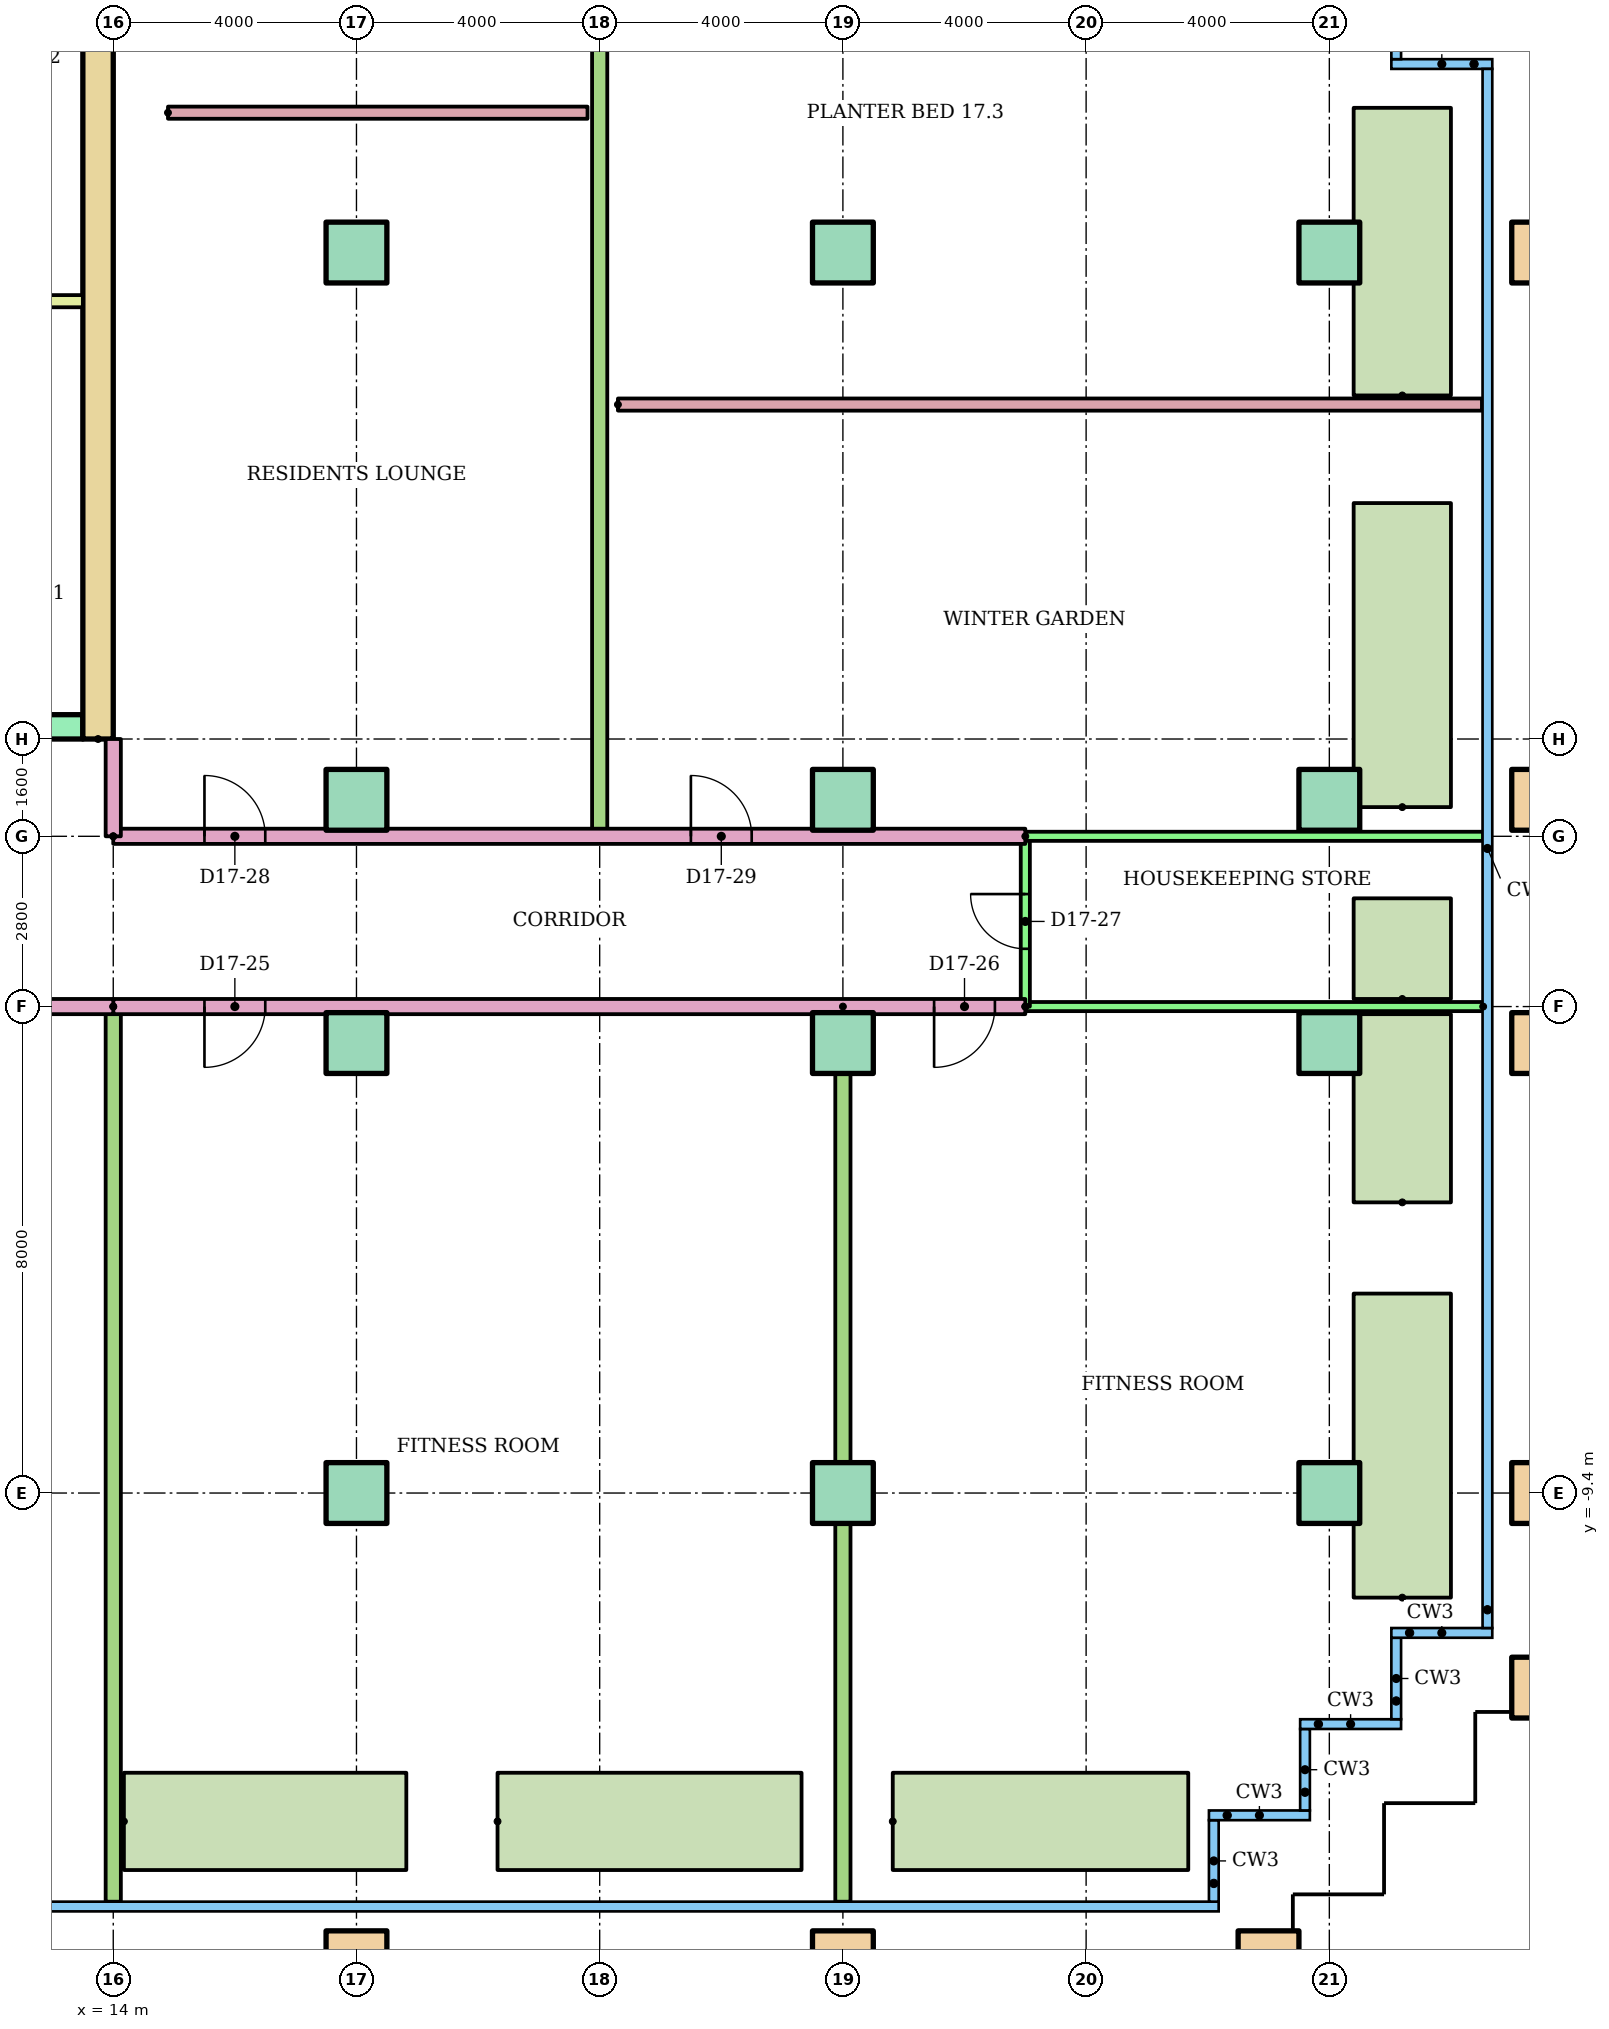
"""IFC4 building model, lengths in metres.
Left out: names, types, materials, properties, quantities, classifications, styles, units other than length and angle.
Written with IfcOpenShell. Run it as: python <this file> out.ifc"""

import sys

from ifc_helpers import new_model, si_unit, direction, frame, frame_2d, origin, origin_2d, place, context, subcontext, project, spatial, rectangle, hollow_rectangle, extrude, element, fill, save


model = new_model("IFC4")
c1 = context("Model", 3, precision=1e-05, world=origin(), true_north=direction((0.0, 1.0)))
c2 = subcontext(c1, "Body", "Model", "MODEL_VIEW")
j1 = project(units=[si_unit("LENGTHUNIT", "METRE"), si_unit("PLANEANGLEUNIT", "RADIAN")], contexts=[c1])
p1 = place(None, origin())
s1 = spatial("IfcSite", under=j1, at=p1, CompositionType="ELEMENT")
p2 = place(p1, origin())
s2 = spatial("IfcBuilding", under=s1, at=p2, CompositionType="ELEMENT")
p3 = place(p2, frame((0.0, 0.0, 64.0)))
s3 = spatial("IfcBuildingStorey", under=s2, at=p3, CompositionType="ELEMENT", Elevation=64.0)
for number, where in (
    (1, (18.0, -17.1, 0.0)),
    (2, (26.0, -17.1, 0.0)),
):
    element("IfcColumn", number, at=place(p3, frame(where)), inside=s3, PredefinedType="COLUMN", context=c2, shape_type="SweptSolid", body=[
        extrude(hollow_rectangle(XDim=1.0, YDim=1.0, WallThickness=0.05, at=origin_2d()), origin(), (0.0, 0.0, 1.0), 9.6),
    ])
for number, where in (
    (3, (33.0, -17.1, 0.0)),
    (4, (37.5, -12.6, 0.0)),
):
    element("IfcColumn", number, at=place(p3, frame(where)), inside=s3, PredefinedType="COLUMN", context=c2, shape_type="SweptSolid", body=[
        extrude(hollow_rectangle(XDim=1.0, YDim=1.0, WallThickness=0.05, at=origin_2d()), origin(), (0.0, 0.0, 1.0), 8.8),
    ])
for number, where in (
    (5, (18.0, -9.4, 0.0)),
    (6, (26.0, -9.4, 0.0)),
    (7, (34.0, -9.4, 0.0)),
):
    element("IfcColumn", number, at=place(p3, frame(where)), inside=s3, PredefinedType="COLUMN", context=c2, shape_type="SweptSolid", body=[
        extrude(rectangle(XDim=1.0, YDim=1.0, at=origin_2d()), origin(), (0.0, 0.0, 1.0), 9.6),
    ])
p4 = place(p3, frame((37.5, -9.4, 0.0)))
e8 = element("IfcColumn", 8, at=p4, inside=s3, PredefinedType="COLUMN", context=c2, shape_type="SweptSolid", body=[
    extrude(hollow_rectangle(XDim=1.0, YDim=1.0, WallThickness=0.05, at=origin_2d()), origin(), (0.0, 0.0, 1.0), 8.8),
])
for number, where in (
    (9, (18.0, -2.0, 0.0)),
    (10, (26.0, -2.0, 0.0)),
    (11, (34.0, -2.0, 0.0)),
):
    element("IfcColumn", number, at=place(p3, frame(where)), inside=s3, PredefinedType="COLUMN", context=c2, shape_type="SweptSolid", body=[
        extrude(rectangle(XDim=1.0, YDim=1.0, at=origin_2d()), origin(), (0.0, 0.0, 1.0), 9.6),
    ])
p5 = place(p3, frame((37.5, -2.0, 0.0)))
e12 = element("IfcColumn", 12, at=p5, inside=s3, PredefinedType="COLUMN", context=c2, shape_type="SweptSolid", body=[
    extrude(hollow_rectangle(XDim=1.0, YDim=1.0, WallThickness=0.05, at=origin_2d()), origin(), (0.0, 0.0, 1.0), 8.8),
])
for number, where in (
    (13, (18.0, 2.0, 0.0)),
    (14, (26.0, 2.0, 0.0)),
    (15, (34.0, 2.0, 0.0)),
):
    element("IfcColumn", number, at=place(p3, frame(where)), inside=s3, PredefinedType="COLUMN", context=c2, shape_type="SweptSolid", body=[
        extrude(rectangle(XDim=1.0, YDim=1.0, at=origin_2d()), origin(), (0.0, 0.0, 1.0), 9.6),
    ])
p6 = place(p3, frame((37.5, 2.0, 0.0)))
e16 = element("IfcColumn", 16, at=p6, inside=s3, PredefinedType="COLUMN", context=c2, shape_type="SweptSolid", body=[
    extrude(hollow_rectangle(XDim=1.0, YDim=1.0, WallThickness=0.05, at=origin_2d()), origin(), (0.0, 0.0, 1.0), 8.8),
])
for number, where in (
    (17, (18.0, 11.0, 0.0)),
    (18, (26.0, 11.0, 0.0)),
    (19, (34.0, 11.0, 0.0)),
):
    element("IfcColumn", number, at=place(p3, frame(where)), inside=s3, PredefinedType="COLUMN", context=c2, shape_type="SweptSolid", body=[
        extrude(rectangle(XDim=1.0, YDim=1.0, at=origin_2d()), origin(), (0.0, 0.0, 1.0), 9.6),
    ])
p7 = place(p3, frame((37.5, 11.0, 0.0)))
e20 = element("IfcColumn", 20, at=p7, inside=s3, PredefinedType="COLUMN", context=c2, shape_type="SweptSolid", body=[
    extrude(hollow_rectangle(XDim=1.0, YDim=1.0, WallThickness=0.05, at=origin_2d()), origin(), (0.0, 0.0, 1.0), 8.8),
])
p8 = place(p3, frame((20.32, -14.8, 0.0)))
e21 = element("IfcWall", 21, at=p8, inside=s3, PredefinedType="STANDARD", context=c2, shape_type="SweptSolid", body=[
    extrude(rectangle(XDim=5.0, YDim=1.6, at=frame_2d((2.5, 0.0))), origin(), (0.0, 0.0, 1.0), 0.8),
])
p9 = place(p3, frame((26.82, -14.8, 0.0)))
e22 = element("IfcWall", 22, at=p9, inside=s3, PredefinedType="STANDARD", context=c2, shape_type="SweptSolid", body=[
    extrude(rectangle(XDim=4.86, YDim=1.6, at=frame_2d((2.43, 0.0))), origin(), (0.0, 0.0, 1.0), 0.8),
])
for number, where, z_axis, x_axis in (
    (23, (35.2, -11.12, 0.0), (0.0, 0.0, 1.0), (0.0, 1.0, 0.0)),
    (24, (35.2, 1.88, 0.0), (0.0, 0.0, 1.0), (0.0, 1.0, 0.0)),
):
    element("IfcWall", number, at=place(p3, frame(where, z_axis=z_axis, x_axis=x_axis)), inside=s3, PredefinedType="STANDARD", context=c2, shape_type="SweptSolid", body=[
        extrude(rectangle(XDim=5.0, YDim=1.6, at=frame_2d((2.5, 0.0))), origin(), (0.0, 0.0, 1.0), 0.8),
    ])
p10 = place(p3, frame((13.75, 3.0, 0.0), z_axis=(0.0, 0.0, 1.0), x_axis=(0.0, 1.0, 0.0)))
e25 = element("IfcWall", 25, at=p10, inside=s3, PredefinedType="SHEAR", context=c2, shape_type="SweptSolid", body=[
    extrude(rectangle(XDim=17.0, YDim=0.5, at=frame_2d((8.5, 0.0))), origin(), (0.0, 0.0, 1.0), 8.8),
])
p11 = place(p3, frame((-13.5, 3.2, 0.0)))
e26 = element("IfcWall", 26, at=p11, inside=s3, PredefinedType="SHEAR", context=c2, shape_type="SweptSolid", body=[
    extrude(rectangle(XDim=27.0, YDim=0.4, at=frame_2d((13.5, 0.0))), origin(), (0.0, 0.0, 1.0), 8.8),
])
p12 = place(p11, frame((6.861, 0.0, 0.0)))
e27 = element("IfcOpeningElement", 27, at=p12, cuts=e26, PredefinedType="OPENING", context=c2, shape_type="SweptSolid", body=[
    extrude(rectangle(XDim=1.1, YDim=2.1, at=frame_2d((0.55, 1.05))), frame((0.0, 0.21, 0.0), z_axis=(0.0, -1.0, 0.0), x_axis=(1.0, 0.0, 0.0)), (0.0, 0.0, 1.0), 0.42),
])
p13 = place(p11, frame((9.906, 0.0, 0.0)))
e28 = element("IfcOpeningElement", 28, at=p13, cuts=e26, PredefinedType="OPENING", context=c2, shape_type="SweptSolid", body=[
    extrude(rectangle(XDim=1.1, YDim=2.1, at=frame_2d((0.55, 1.05))), frame((0.0, 0.21, 0.0), z_axis=(0.0, -1.0, 0.0), x_axis=(1.0, 0.0, 0.0)), (0.0, 0.0, 1.0), 0.42),
])
p14 = place(p11, frame((15.994, 0.0, 0.0)))
e29 = element("IfcOpeningElement", 29, at=p14, cuts=e26, PredefinedType="OPENING", context=c2, shape_type="SweptSolid", body=[
    extrude(rectangle(XDim=1.1, YDim=2.1, at=frame_2d((0.55, 1.05))), frame((0.0, 0.21, 0.0), z_axis=(0.0, -1.0, 0.0), x_axis=(1.0, 0.0, 0.0)), (0.0, 0.0, 1.0), 0.42),
])
p15 = place(p11, frame((19.039, 0.0, 0.0)))
e30 = element("IfcOpeningElement", 30, at=p15, cuts=e26, PredefinedType="OPENING", context=c2, shape_type="SweptSolid", body=[
    extrude(rectangle(XDim=1.1, YDim=2.1, at=frame_2d((0.55, 1.05))), frame((0.0, 0.21, 0.0), z_axis=(0.0, -1.0, 0.0), x_axis=(1.0, 0.0, 0.0)), (0.0, 0.0, 1.0), 0.42),
])
p16 = place(p11, frame((12.6, 0.0, 0.0)))
e31 = element("IfcOpeningElement", 31, at=p16, cuts=e26, PredefinedType="OPENING", context=c2, shape_type="SweptSolid", body=[
    extrude(rectangle(XDim=1.8, YDim=2.1, at=frame_2d((0.9, 1.05))), frame((0.0, 0.21, 0.0), z_axis=(0.0, -1.0, 0.0), x_axis=(1.0, 0.0, 0.0)), (0.0, 0.0, 1.0), 0.42),
])
p17 = place(p3, frame((9.6, 10.2, 0.0)))
e32 = element("IfcWall", 32, at=p17, inside=s3, PredefinedType="PARTITIONING", context=c2, shape_type="SweptSolid", body=[
    extrude(rectangle(XDim=3.9, YDim=0.2, at=frame_2d((1.95, 0.0))), origin(), (0.0, 0.0, 1.0), 8.8),
])
p18 = place(p3, frame((29.0, -1.4, 0.0), z_axis=(0.0, 0.0, 1.0), x_axis=(-1.0, 0.0, 0.0)))
e33 = element("IfcWall", 33, at=p18, inside=s3, PredefinedType="PARTITIONING", context=c2, shape_type="SweptSolid", body=[
    extrude(rectangle(XDim=15.0, YDim=0.25, at=frame_2d((7.5, 0.0))), origin(), (0.0, 0.0, 1.0), 8.8),
])
p19 = place(p18, frame((12.5, 0.0, 0.0)))
e34 = element("IfcOpeningElement", 34, at=p19, cuts=e33, PredefinedType="OPENING", context=c2, shape_type="SweptSolid", body=[
    extrude(rectangle(XDim=1.0, YDim=2.1, at=frame_2d((0.5, 1.05))), frame((0.0, 0.135, 0.0), z_axis=(0.0, -1.0, 0.0), x_axis=(1.0, 0.0, 0.0)), (0.0, 0.0, 1.0), 0.27),
])
p20 = place(p18, frame((0.5, 0.0, 0.0)))
e35 = element("IfcOpeningElement", 35, at=p20, cuts=e33, PredefinedType="OPENING", context=c2, shape_type="SweptSolid", body=[
    extrude(rectangle(XDim=1.0, YDim=2.1, at=frame_2d((0.5, 1.05))), frame((0.0, 0.135, 0.0), z_axis=(0.0, -1.0, 0.0), x_axis=(1.0, 0.0, 0.0)), (0.0, 0.0, 1.0), 0.27),
])
p21 = place(p3, frame((36.53, -1.4, 0.0), z_axis=(0.0, 0.0, 1.0), x_axis=(-1.0, 0.0, 0.0)))
e36 = element("IfcWall", 36, at=p21, inside=s3, PredefinedType="PARTITIONING", context=c2, shape_type="SweptSolid", body=[
    extrude(rectangle(XDim=7.53, YDim=0.15, at=frame_2d((3.765, 0.0))), origin(), (0.0, 0.0, 1.0), 8.8),
])
p22 = place(p3, frame((29.0, -1.4, 0.0), z_axis=(0.0, 0.0, 1.0), x_axis=(0.0, 1.0, 0.0)))
e37 = element("IfcWall", 37, at=p22, inside=s3, PredefinedType="PARTITIONING", context=c2, shape_type="SweptSolid", body=[
    extrude(rectangle(XDim=2.8, YDim=0.15, at=frame_2d((1.4, 0.0))), origin(), (0.0, 0.0, 1.0), 8.8),
])
p23 = place(p22, frame((0.95, 0.0, 0.0)))
e38 = element("IfcOpeningElement", 38, at=p23, cuts=e37, PredefinedType="OPENING", context=c2, shape_type="SweptSolid", body=[
    extrude(rectangle(XDim=0.9, YDim=2.1, at=frame_2d((0.45, 1.05))), frame((0.0, 0.085, 0.0), z_axis=(0.0, -1.0, 0.0), x_axis=(1.0, 0.0, 0.0)), (0.0, 0.0, 1.0), 0.17),
])
for number, where, z_axis, x_axis in (
    (39, (14.0, -1.4, 0.0), (0.0, 0.0, 1.0), (0.0, -1.0, 0.0)),
    (40, (26.0, -1.4, 0.0), (0.0, 0.0, 1.0), (0.0, -1.0, 0.0)),
):
    element("IfcWall", number, at=place(p3, frame(where, z_axis=z_axis, x_axis=x_axis)), inside=s3, PredefinedType="PARTITIONING", context=c2, shape_type="SweptSolid", body=[
        extrude(rectangle(XDim=14.721, YDim=0.25, at=frame_2d((7.361, 0.0))), origin(), (0.0, 0.0, 1.0), 8.8),
    ])
p24 = place(p3, frame((14.0, 1.4, 0.0)))
e41 = element("IfcWall", 41, at=p24, inside=s3, PredefinedType="PARTITIONING", context=c2, shape_type="SweptSolid", body=[
    extrude(rectangle(XDim=15.0, YDim=0.25, at=frame_2d((7.5, 0.0))), origin(), (0.0, 0.0, 1.0), 8.8),
])
p25 = place(p24, frame((1.5, 0.0, 0.0)))
e42 = element("IfcOpeningElement", 42, at=p25, cuts=e41, PredefinedType="OPENING", context=c2, shape_type="SweptSolid", body=[
    extrude(rectangle(XDim=1.0, YDim=2.1, at=frame_2d((0.5, 1.05))), frame((0.0, 0.135, 0.0), z_axis=(0.0, -1.0, 0.0), x_axis=(1.0, 0.0, 0.0)), (0.0, 0.0, 1.0), 0.27),
])
p26 = place(p24, frame((9.5, 0.0, 0.0)))
e43 = element("IfcOpeningElement", 43, at=p26, cuts=e41, PredefinedType="OPENING", context=c2, shape_type="SweptSolid", body=[
    extrude(rectangle(XDim=1.0, YDim=2.1, at=frame_2d((0.5, 1.05))), frame((0.0, 0.135, 0.0), z_axis=(0.0, -1.0, 0.0), x_axis=(1.0, 0.0, 0.0)), (0.0, 0.0, 1.0), 0.27),
])
p27 = place(p3, frame((29.0, 1.4, 0.0)))
e44 = element("IfcWall", 44, at=p27, inside=s3, PredefinedType="PARTITIONING", context=c2, shape_type="SweptSolid", body=[
    extrude(rectangle(XDim=7.53, YDim=0.15, at=frame_2d((3.765, 0.0))), origin(), (0.0, 0.0, 1.0), 8.8),
])
p28 = place(p3, frame((22.0, 18.521, 0.0), z_axis=(0.0, 0.0, 1.0), x_axis=(0.0, -1.0, 0.0)))
e45 = element("IfcWall", 45, at=p28, inside=s3, PredefinedType="PARTITIONING", context=c2, shape_type="SweptSolid", body=[
    extrude(rectangle(XDim=17.121, YDim=0.25, at=frame_2d((8.561, 0.0))), origin(), (0.0, 0.0, 1.0), 8.8),
])
p29 = place(p3, frame((14.0, -1.4, 0.0), z_axis=(0.0, 0.0, 1.0), x_axis=(-1.0, 0.0, 0.0)))
e46 = element("IfcWall", 46, at=p29, inside=s3, PredefinedType="PARTITIONING", context=c2, shape_type="SweptSolid", body=[
    extrude(rectangle(XDim=28.0, YDim=0.25, at=frame_2d((14.0, 0.0))), origin(), (0.0, 0.0, 1.0), 8.8),
])
p30 = place(p29, frame((21.5, 0.0, 0.0)))
e47 = element("IfcOpeningElement", 47, at=p30, cuts=e46, PredefinedType="OPENING", context=c2, shape_type="SweptSolid", body=[
    extrude(rectangle(XDim=1.0, YDim=2.1, at=frame_2d((0.5, 1.05))), frame((0.0, 0.135, 0.0), z_axis=(0.0, -1.0, 0.0), x_axis=(1.0, 0.0, 0.0)), (0.0, 0.0, 1.0), 0.27),
])
p31 = place(p29, frame((17.5, 0.0, 0.0)))
e48 = element("IfcOpeningElement", 48, at=p31, cuts=e46, PredefinedType="OPENING", context=c2, shape_type="SweptSolid", body=[
    extrude(rectangle(XDim=1.0, YDim=2.1, at=frame_2d((0.5, 1.05))), frame((0.0, 0.135, 0.0), z_axis=(0.0, -1.0, 0.0), x_axis=(1.0, 0.0, 0.0)), (0.0, 0.0, 1.0), 0.27),
])
p32 = place(p29, frame((1.5, 0.0, 0.0)))
e49 = element("IfcOpeningElement", 49, at=p32, cuts=e46, PredefinedType="OPENING", context=c2, shape_type="SweptSolid", body=[
    extrude(rectangle(XDim=1.0, YDim=2.1, at=frame_2d((0.5, 1.05))), frame((0.0, 0.135, 0.0), z_axis=(0.0, -1.0, 0.0), x_axis=(1.0, 0.0, 0.0)), (0.0, 0.0, 1.0), 0.27),
])
p33 = place(p3, frame((14.0, 1.4, 0.0), z_axis=(0.0, 0.0, 1.0), x_axis=(0.0, 1.0, 0.0)))
e50 = element("IfcWall", 50, at=p33, inside=s3, PredefinedType="PARTITIONING", context=c2, shape_type="SweptSolid", body=[
    extrude(rectangle(XDim=1.6, YDim=0.25, at=frame_2d((0.8, 0.0))), origin(), (0.0, 0.0, 1.0), 8.8),
])
p34 = place(p3, frame((14.9, 13.3, 0.0)))
e51 = element("IfcWall", 51, at=p34, inside=s3, PredefinedType="PARTITIONING", context=c2, shape_type="SweptSolid", body=[
    extrude(rectangle(XDim=6.9, YDim=0.2, at=frame_2d((3.45, 0.0))), origin(), (0.0, 0.0, 1.0), 0.9),
])
p35 = place(p3, frame((22.3, 8.5, 0.0)))
e52 = element("IfcWall", 52, at=p35, inside=s3, PredefinedType="PARTITIONING", context=c2, shape_type="SweptSolid", body=[
    extrude(rectangle(XDim=14.21, YDim=0.2, at=frame_2d((7.105, 0.0))), origin(), (0.0, 0.0, 1.0), 0.9),
])
p36 = place(p3, frame((14.175, -14.8, 0.0)))
e53 = element("IfcWall", 53, at=p36, inside=s3, PredefinedType="STANDARD", context=c2, shape_type="SweptSolid", body=[
    extrude(rectangle(XDim=4.645, YDim=1.6, at=frame_2d((2.323, 0.0))), origin(), (0.0, 0.0, 1.0), 0.8),
])
p37 = place(p3, frame((35.2, -4.62, 0.0), z_axis=(0.0, 0.0, 1.0), x_axis=(0.0, 1.0, 0.0)))
e54 = element("IfcWall", 54, at=p37, inside=s3, PredefinedType="STANDARD", context=c2, shape_type="SweptSolid", body=[
    extrude(rectangle(XDim=3.095, YDim=1.6, at=frame_2d((1.548, 0.0))), origin(), (0.0, 0.0, 1.0), 0.8),
])
p38 = place(p3, frame((35.2, -1.275, 0.0), z_axis=(0.0, 0.0, 1.0), x_axis=(0.0, 1.0, 0.0)))
e55 = element("IfcWall", 55, at=p38, inside=s3, PredefinedType="STANDARD", context=c2, shape_type="SweptSolid", body=[
    extrude(rectangle(XDim=1.655, YDim=1.6, at=frame_2d((0.827, 0.0))), origin(), (0.0, 0.0, 1.0), 0.8),
])
p39 = place(p3, frame((35.2, 8.65, 0.0), z_axis=(0.0, 0.0, 1.0), x_axis=(0.0, 1.0, 0.0)))
e56 = element("IfcWall", 56, at=p39, inside=s3, PredefinedType="STANDARD", context=c2, shape_type="SweptSolid", body=[
    extrude(rectangle(XDim=4.73, YDim=1.6, at=frame_2d((2.365, 0.0))), origin(), (0.0, 0.0, 1.0), 0.8),
])
p40 = place(p19, origin())
e57 = element("IfcDoor", 57, at=p40, inside=s3, OperationType="SINGLE_SWING_RIGHT", PredefinedType="DOOR", context=c2, shape_type="SweptSolid", body=[
    extrude(rectangle(XDim=1.0, YDim=2.1, at=frame_2d((0.5, 1.05))), frame((0.0, 0.025, 0.0), z_axis=(0.0, -1.0, 0.0), x_axis=(1.0, 0.0, 0.0)), (0.0, 0.0, 1.0), 0.05),
])
fill(e34, e57)
p41 = place(p20, origin())
e58 = element("IfcDoor", 58, at=p41, inside=s3, OperationType="SINGLE_SWING_RIGHT", PredefinedType="DOOR", context=c2, shape_type="SweptSolid", body=[
    extrude(rectangle(XDim=1.0, YDim=2.1, at=frame_2d((0.5, 1.05))), frame((0.0, 0.025, 0.0), z_axis=(0.0, -1.0, 0.0), x_axis=(1.0, 0.0, 0.0)), (0.0, 0.0, 1.0), 0.05),
])
fill(e35, e58)
p42 = place(p23, origin())
e59 = element("IfcDoor", 59, at=p42, inside=s3, OperationType="SINGLE_SWING_RIGHT", PredefinedType="DOOR", context=c2, shape_type="SweptSolid", body=[
    extrude(rectangle(XDim=0.9, YDim=2.1, at=frame_2d((0.45, 1.05))), frame((0.0, 0.025, 0.0), z_axis=(0.0, -1.0, 0.0), x_axis=(1.0, 0.0, 0.0)), (0.0, 0.0, 1.0), 0.05),
])
fill(e38, e59)
p43 = place(p25, origin())
e60 = element("IfcDoor", 60, at=p43, inside=s3, OperationType="SINGLE_SWING_LEFT", PredefinedType="DOOR", context=c2, shape_type="SweptSolid", body=[
    extrude(rectangle(XDim=1.0, YDim=2.1, at=frame_2d((0.5, 1.05))), frame((0.0, 0.025, 0.0), z_axis=(0.0, -1.0, 0.0), x_axis=(1.0, 0.0, 0.0)), (0.0, 0.0, 1.0), 0.05),
])
fill(e42, e60)
p44 = place(p26, origin())
e61 = element("IfcDoor", 61, at=p44, inside=s3, OperationType="SINGLE_SWING_LEFT", PredefinedType="DOOR", context=c2, shape_type="SweptSolid", body=[
    extrude(rectangle(XDim=1.0, YDim=2.1, at=frame_2d((0.5, 1.05))), frame((0.0, 0.025, 0.0), z_axis=(0.0, -1.0, 0.0), x_axis=(1.0, 0.0, 0.0)), (0.0, 0.0, 1.0), 0.05),
])
fill(e43, e61)
save(model, sys.argv[1])
